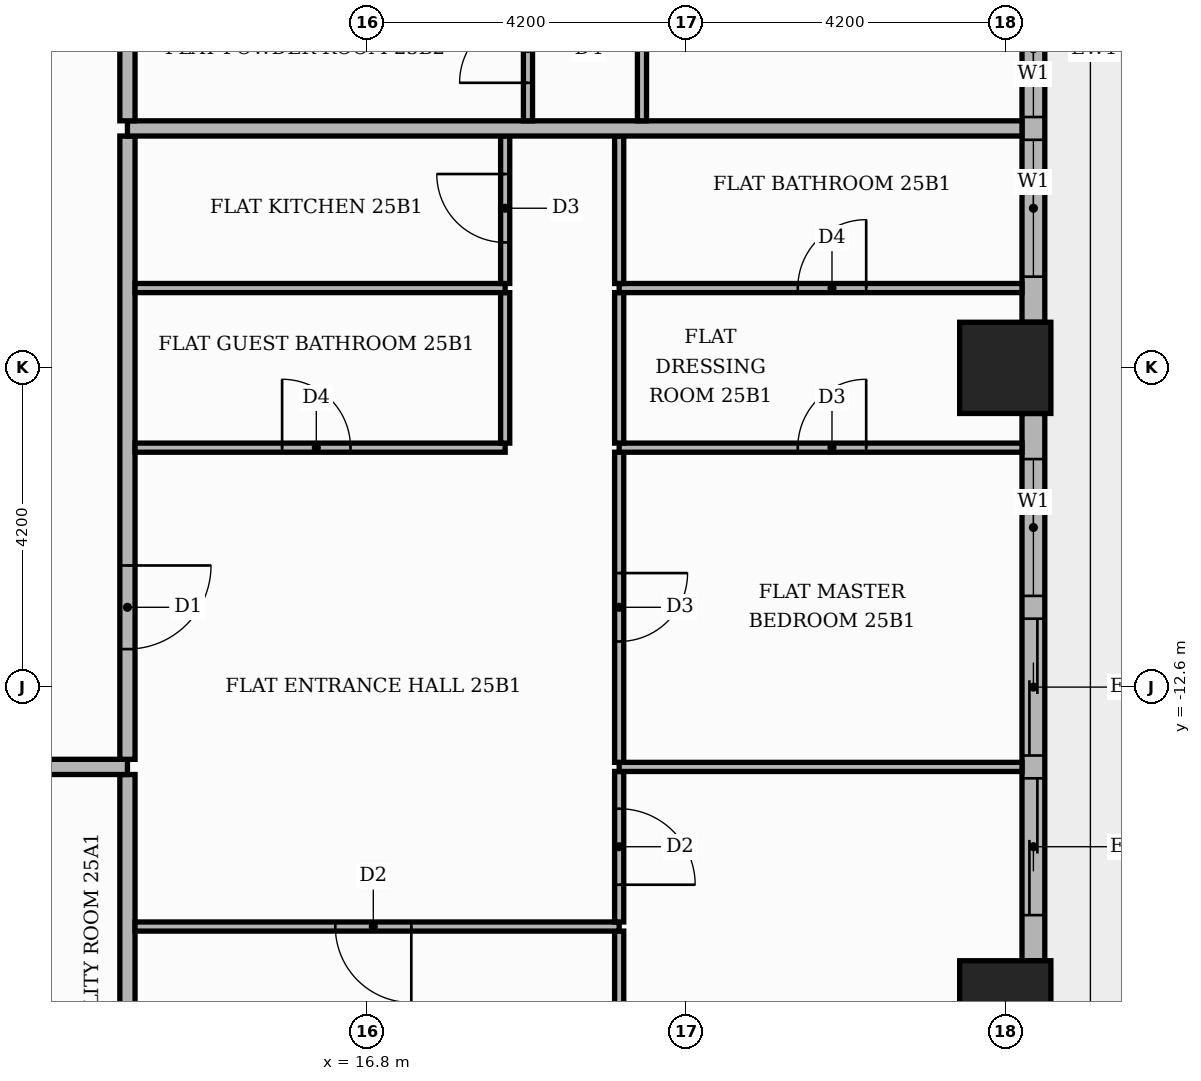
"""IFC4 building model, lengths in metres.
Left out: names, types, materials, properties, quantities, classifications, styles, units other than length and angle.
Written with IfcOpenShell. Run it as: python <this file> out.ifc"""

import sys

from ifc_helpers import new_model, si_unit, direction, frame, frame_2d, origin, origin_2d, place, context, subcontext, project, spatial, rectangle, extrude, element, fill, save


model = new_model("IFC4")
c1 = context("Model", 3, precision=1e-05, world=origin(), true_north=direction((0.0, 1.0)))
c2 = subcontext(c1, "Body", "Model", "MODEL_VIEW")
j1 = project(units=[si_unit("LENGTHUNIT", "METRE"), si_unit("PLANEANGLEUNIT", "RADIAN")], contexts=[c1])
p1 = place(None, origin())
s1 = spatial("IfcSite", under=j1, at=p1, CompositionType="ELEMENT")
p2 = place(p1, origin())
s2 = spatial("IfcBuilding", under=s1, at=p2, CompositionType="ELEMENT")
p3 = place(p2, frame((0.0, 0.0, 106.5)))
s3 = spatial("IfcBuildingStorey", under=s2, at=p3, CompositionType="ELEMENT", Elevation=106.5)
for number, where, z_axis, x_axis in (
    (1, (25.2, -8.4, 0.0), (0.0, 0.0, 1.0), (1.0, 0.0, 0.0)),
    (2, (25.2, -16.8, 0.0), (0.0, 0.0, 1.0), (1.0, 0.0, 0.0)),
):
    element("IfcColumn", number, at=place(p3, frame(where, z_axis=z_axis, x_axis=x_axis)), inside=s3, PredefinedType="COLUMN", context=c2, shape_type="SweptSolid", body=[
        extrude(rectangle(XDim=1.2, YDim=1.2, at=origin_2d()), origin(), (0.0, 0.0, 1.0), 3.9),
    ])
p4 = place(p3, frame((25.57, -16.2, 0.0), z_axis=(0.0, 0.0, 1.0), x_axis=(0.0, 1.0, 0.0)))
e3 = element("IfcWall", 3, at=p4, inside=s3, PredefinedType="STANDARD", context=c2, shape_type="SweptSolid", body=[
    extrude(rectangle(XDim=7.2, YDim=0.3, at=frame_2d((3.6, 0.0))), origin(), (0.0, 0.0, 1.0), 3.48),
])
p5 = place(p4, frame((0.6, 0.0, 0.0)))
e4 = element("IfcOpeningElement", 4, at=p5, cuts=e3, PredefinedType="OPENING", context=c2, shape_type="SweptSolid", body=[
    extrude(rectangle(XDim=1.8, YDim=2.4, at=frame_2d((0.9, 1.2))), frame((0.0, 0.16, 0.0), z_axis=(0.0, -1.0, 0.0), x_axis=(1.0, 0.0, 0.0)), (0.0, 0.0, 1.0), 0.32),
])
p6 = place(p4, frame((2.7, 0.0, 0.0)))
e5 = element("IfcOpeningElement", 5, at=p6, cuts=e3, PredefinedType="OPENING", context=c2, shape_type="SweptSolid", body=[
    extrude(rectangle(XDim=1.8, YDim=2.4, at=frame_2d((0.9, 1.2))), frame((0.0, 0.16, 0.0), z_axis=(0.0, -1.0, 0.0), x_axis=(1.0, 0.0, 0.0)), (0.0, 0.0, 1.0), 0.32),
])
p7 = place(p4, frame((4.8, 0.0, 0.9)))
e6 = element("IfcOpeningElement", 6, at=p7, cuts=e3, PredefinedType="OPENING", context=c2, shape_type="SweptSolid", body=[
    extrude(rectangle(XDim=1.8, YDim=2.1, at=frame_2d((0.9, 1.05))), frame((0.0, 0.16, 0.0), z_axis=(0.0, -1.0, 0.0), x_axis=(1.0, 0.0, 0.0)), (0.0, 0.0, 1.0), 0.32),
])
p8 = place(p3, frame((25.57, -7.8, 0.0), z_axis=(0.0, 0.0, 1.0), x_axis=(0.0, 1.0, 0.0)))
e7 = element("IfcWall", 7, at=p8, inside=s3, PredefinedType="STANDARD", context=c2, shape_type="SweptSolid", body=[
    extrude(rectangle(XDim=7.2, YDim=0.3, at=frame_2d((3.6, 0.0))), origin(), (0.0, 0.0, 1.0), 3.48),
])
p9 = place(p8, frame((0.6, 0.0, 0.9)))
e8 = element("IfcOpeningElement", 8, at=p9, cuts=e7, PredefinedType="OPENING", context=c2, shape_type="SweptSolid", body=[
    extrude(rectangle(XDim=1.8, YDim=2.1, at=frame_2d((0.9, 1.05))), frame((0.0, 0.16, 0.0), z_axis=(0.0, -1.0, 0.0), x_axis=(1.0, 0.0, 0.0)), (0.0, 0.0, 1.0), 0.32),
])
p10 = place(p8, frame((2.7, 0.0, 0.9)))
e9 = element("IfcOpeningElement", 9, at=p10, cuts=e7, PredefinedType="OPENING", context=c2, shape_type="SweptSolid", body=[
    extrude(rectangle(XDim=1.8, YDim=2.1, at=frame_2d((0.9, 1.05))), frame((0.0, 0.16, 0.0), z_axis=(0.0, -1.0, 0.0), x_axis=(1.0, 0.0, 0.0)), (0.0, 0.0, 1.0), 0.32),
])
p11 = place(p8, frame((4.8, 0.0, 0.0)))
e10 = element("IfcOpeningElement", 10, at=p11, cuts=e7, PredefinedType="OPENING", context=c2, shape_type="SweptSolid", body=[
    extrude(rectangle(XDim=1.8, YDim=2.4, at=frame_2d((0.9, 1.2))), frame((0.0, 0.16, 0.0), z_axis=(0.0, -1.0, 0.0), x_axis=(1.0, 0.0, 0.0)), (0.0, 0.0, 1.0), 0.32),
])
p12 = place(p3, frame((13.65, -25.42, 0.0), z_axis=(0.0, 0.0, 1.0), x_axis=(0.0, 1.0, 0.0)))
e11 = element("IfcWall", 11, at=p12, inside=s3, PredefinedType="PARTITIONING", context=c2, shape_type="SweptSolid", body=[
    extrude(rectangle(XDim=11.67, YDim=0.2, at=frame_2d((5.835, 0.0))), origin(), (0.0, 0.0, 1.0), 3.48),
])
p13 = place(p3, frame((20.12, -17.4, 0.0), z_axis=(0.0, 0.0, 1.0), x_axis=(0.0, 1.0, 0.0)))
e12 = element("IfcWall", 12, at=p13, inside=s3, PredefinedType="PARTITIONING", context=c2, shape_type="SweptSolid", body=[
    extrude(rectangle(XDim=1.59, YDim=0.12, at=frame_2d((0.795, 0.0))), origin(), (0.0, 0.0, 1.0), 3.48),
])
p14 = place(p3, frame((13.75, -15.75, 0.0), z_axis=(0.0, 0.0, 1.0), x_axis=(1.0, 0.0, 0.0)))
e13 = element("IfcWall", 13, at=p14, inside=s3, PredefinedType="PARTITIONING", context=c2, shape_type="SweptSolid", body=[
    extrude(rectangle(XDim=6.37, YDim=0.12, at=frame_2d((3.185, 0.0))), origin(), (0.0, 0.0, 1.0), 3.48),
])
p15 = place(p14, frame((2.635, 0.0, 0.0)))
e14 = element("IfcOpeningElement", 14, at=p15, cuts=e13, PredefinedType="OPENING", context=c2, shape_type="SweptSolid", body=[
    extrude(rectangle(XDim=1.0, YDim=2.1, at=frame_2d((0.5, 1.05))), frame((0.0, 0.07, 0.0), z_axis=(0.0, -1.0, 0.0), x_axis=(1.0, 0.0, 0.0)), (0.0, 0.0, 1.0), 0.14),
])
p16 = place(p3, frame((20.12, -15.69, 0.0), z_axis=(0.0, 0.0, 1.0), x_axis=(0.0, 1.0, 0.0)))
e15 = element("IfcWall", 15, at=p16, inside=s3, PredefinedType="PARTITIONING", context=c2, shape_type="SweptSolid", body=[
    extrude(rectangle(XDim=1.98, YDim=0.12, at=frame_2d((0.99, 0.0))), origin(), (0.0, 0.0, 1.0), 3.48),
])
p17 = place(p16, frame((0.49, 0.0, 0.0)))
e16 = element("IfcOpeningElement", 16, at=p17, cuts=e15, PredefinedType="OPENING", context=c2, shape_type="SweptSolid", body=[
    extrude(rectangle(XDim=1.0, YDim=2.1, at=frame_2d((0.5, 1.05))), frame((0.0, 0.07, 0.0), z_axis=(0.0, -1.0, 0.0), x_axis=(1.0, 0.0, 0.0)), (0.0, 0.0, 1.0), 0.14),
])
p18 = place(p3, frame((-25.42, -13.65, 0.0), z_axis=(0.0, 0.0, 1.0), x_axis=(1.0, 0.0, 0.0)))
e17 = element("IfcWall", 17, at=p18, inside=s3, PredefinedType="PARTITIONING", context=c2, shape_type="SweptSolid", body=[
    extrude(rectangle(XDim=39.07, YDim=0.2, at=frame_2d((19.535, 0.0))), origin(), (0.0, 0.0, 1.0), 3.48),
])
p19 = place(p18, frame((13.32, 0.0, 0.0)))
e18 = element("IfcOpeningElement", 18, at=p19, cuts=e17, PredefinedType="OPENING", context=c2, shape_type="SweptSolid", body=[
    extrude(rectangle(XDim=1.1, YDim=2.4, at=frame_2d((0.55, 1.2))), frame((0.0, 0.11, 0.0), z_axis=(0.0, -1.0, 0.0), x_axis=(1.0, 0.0, 0.0)), (0.0, 0.0, 1.0), 0.22),
])
p20 = place(p3, frame((20.12, -13.65, 0.0), z_axis=(0.0, 0.0, 1.0), x_axis=(1.0, 0.0, 0.0)))
e19 = element("IfcWall", 19, at=p20, inside=s3, PredefinedType="PARTITIONING", context=c2, shape_type="SweptSolid", body=[
    extrude(rectangle(XDim=5.3, YDim=0.12, at=frame_2d((2.65, 0.0))), origin(), (0.0, 0.0, 1.0), 3.48),
])
p21 = place(p3, frame((20.12, -13.59, 0.0), z_axis=(0.0, 0.0, 1.0), x_axis=(0.0, 1.0, 0.0)))
e20 = element("IfcWall", 20, at=p21, inside=s3, PredefinedType="PARTITIONING", context=c2, shape_type="SweptSolid", body=[
    extrude(rectangle(XDim=4.08, YDim=0.12, at=frame_2d((2.04, 0.0))), origin(), (0.0, 0.0, 1.0), 3.48),
])
p22 = place(p21, frame((1.59, 0.0, 0.0)))
e21 = element("IfcOpeningElement", 21, at=p22, cuts=e20, PredefinedType="OPENING", context=c2, shape_type="SweptSolid", body=[
    extrude(rectangle(XDim=0.9, YDim=2.1, at=frame_2d((0.45, 1.05))), frame((0.0, 0.07, 0.0), z_axis=(0.0, -1.0, 0.0), x_axis=(1.0, 0.0, 0.0)), (0.0, 0.0, 1.0), 0.14),
])
p23 = place(p3, frame((13.65, -13.55, 0.0), z_axis=(0.0, 0.0, 1.0), x_axis=(0.0, 1.0, 0.0)))
e22 = element("IfcWall", 22, at=p23, inside=s3, PredefinedType="PARTITIONING", context=c2, shape_type="SweptSolid", body=[
    extrude(rectangle(XDim=8.2, YDim=0.2, at=frame_2d((4.1, 0.0))), origin(), (0.0, 0.0, 1.0), 3.48),
])
p24 = place(p23, frame((1.45, 0.0, 0.0)))
e23 = element("IfcOpeningElement", 23, at=p24, cuts=e22, PredefinedType="OPENING", context=c2, shape_type="SweptSolid", body=[
    extrude(rectangle(XDim=1.1, YDim=2.4, at=frame_2d((0.55, 1.2))), frame((0.0, 0.11, 0.0), z_axis=(0.0, -1.0, 0.0), x_axis=(1.0, 0.0, 0.0)), (0.0, 0.0, 1.0), 0.22),
])
p25 = place(p3, frame((13.75, -9.45, 0.0), z_axis=(0.0, 0.0, 1.0), x_axis=(1.0, 0.0, 0.0)))
e24 = element("IfcWall", 24, at=p25, inside=s3, PredefinedType="PARTITIONING", context=c2, shape_type="SweptSolid", body=[
    extrude(rectangle(XDim=4.87, YDim=0.12, at=frame_2d((2.435, 0.0))), origin(), (0.0, 0.0, 1.0), 3.48),
])
p26 = place(p25, frame((1.935, 0.0, 0.0)))
e25 = element("IfcOpeningElement", 25, at=p26, cuts=e24, PredefinedType="OPENING", context=c2, shape_type="SweptSolid", body=[
    extrude(rectangle(XDim=0.9, YDim=2.1, at=frame_2d((0.45, 1.05))), frame((0.0, 0.07, 0.0), z_axis=(0.0, -1.0, 0.0), x_axis=(1.0, 0.0, 0.0)), (0.0, 0.0, 1.0), 0.14),
])
p27 = place(p3, frame((20.12, -9.45, 0.0), z_axis=(0.0, 0.0, 1.0), x_axis=(1.0, 0.0, 0.0)))
e26 = element("IfcWall", 26, at=p27, inside=s3, PredefinedType="PARTITIONING", context=c2, shape_type="SweptSolid", body=[
    extrude(rectangle(XDim=5.3, YDim=0.12, at=frame_2d((2.65, 0.0))), origin(), (0.0, 0.0, 1.0), 3.48),
])
p28 = place(p27, frame((2.35, 0.0, 0.0)))
e27 = element("IfcOpeningElement", 27, at=p28, cuts=e26, PredefinedType="OPENING", context=c2, shape_type="SweptSolid", body=[
    extrude(rectangle(XDim=0.9, YDim=2.1, at=frame_2d((0.45, 1.05))), frame((0.0, 0.07, 0.0), z_axis=(0.0, -1.0, 0.0), x_axis=(1.0, 0.0, 0.0)), (0.0, 0.0, 1.0), 0.14),
])
for number, where, z_axis, x_axis in (
    (28, (18.62, -9.39, 0.0), (0.0, 0.0, 1.0), (0.0, 1.0, 0.0)),
    (29, (20.12, -9.39, 0.0), (0.0, 0.0, 1.0), (0.0, 1.0, 0.0)),
):
    element("IfcWall", number, at=place(p3, frame(where, z_axis=z_axis, x_axis=x_axis)), inside=s3, PredefinedType="PARTITIONING", context=c2, shape_type="SweptSolid", body=[
        extrude(rectangle(XDim=1.98, YDim=0.12, at=frame_2d((0.99, 0.0))), origin(), (0.0, 0.0, 1.0), 3.48),
    ])
p29 = place(p3, frame((13.75, -7.35, 0.0), z_axis=(0.0, 0.0, 1.0), x_axis=(1.0, 0.0, 0.0)))
e30 = element("IfcWall", 30, at=p29, inside=s3, PredefinedType="PARTITIONING", context=c2, shape_type="SweptSolid", body=[
    extrude(rectangle(XDim=4.87, YDim=0.12, at=frame_2d((2.435, 0.0))), origin(), (0.0, 0.0, 1.0), 3.48),
])
p30 = place(p3, frame((20.12, -7.35, 0.0), z_axis=(0.0, 0.0, 1.0), x_axis=(1.0, 0.0, 0.0)))
e31 = element("IfcWall", 31, at=p30, inside=s3, PredefinedType="PARTITIONING", context=c2, shape_type="SweptSolid", body=[
    extrude(rectangle(XDim=5.3, YDim=0.12, at=frame_2d((2.65, 0.0))), origin(), (0.0, 0.0, 1.0), 3.48),
])
p31 = place(p30, frame((2.35, 0.0, 0.0)))
e32 = element("IfcOpeningElement", 32, at=p31, cuts=e31, PredefinedType="OPENING", context=c2, shape_type="SweptSolid", body=[
    extrude(rectangle(XDim=0.9, YDim=2.1, at=frame_2d((0.45, 1.05))), frame((0.0, 0.07, 0.0), z_axis=(0.0, -1.0, 0.0), x_axis=(1.0, 0.0, 0.0)), (0.0, 0.0, 1.0), 0.14),
])
p32 = place(p3, frame((18.62, -7.29, 0.0), z_axis=(0.0, 0.0, 1.0), x_axis=(0.0, 1.0, 0.0)))
e33 = element("IfcWall", 33, at=p32, inside=s3, PredefinedType="PARTITIONING", context=c2, shape_type="SweptSolid", body=[
    extrude(rectangle(XDim=1.94, YDim=0.12, at=frame_2d((0.97, 0.0))), origin(), (0.0, 0.0, 1.0), 3.48),
])
p33 = place(p32, frame((0.54, 0.0, 0.0)))
e34 = element("IfcOpeningElement", 34, at=p33, cuts=e33, PredefinedType="OPENING", context=c2, shape_type="SweptSolid", body=[
    extrude(rectangle(XDim=0.9, YDim=2.1, at=frame_2d((0.45, 1.05))), frame((0.0, 0.07, 0.0), z_axis=(0.0, -1.0, 0.0), x_axis=(1.0, 0.0, 0.0)), (0.0, 0.0, 1.0), 0.14),
])
p34 = place(p3, frame((20.12, -7.29, 0.0), z_axis=(0.0, 0.0, 1.0), x_axis=(0.0, 1.0, 0.0)))
e35 = element("IfcWall", 35, at=p34, inside=s3, PredefinedType="PARTITIONING", context=c2, shape_type="SweptSolid", body=[
    extrude(rectangle(XDim=1.94, YDim=0.12, at=frame_2d((0.97, 0.0))), origin(), (0.0, 0.0, 1.0), 3.48),
])
p35 = place(p3, frame((13.65, -5.25, 0.0), z_axis=(0.0, 0.0, 1.0), x_axis=(1.0, 0.0, 0.0)))
e36 = element("IfcWall", 36, at=p35, inside=s3, PredefinedType="PARTITIONING", context=c2, shape_type="SweptSolid", body=[
    extrude(rectangle(XDim=11.77, YDim=0.2, at=frame_2d((5.885, 0.0))), origin(), (0.0, 0.0, 1.0), 3.48),
])
p36 = place(p3, frame((13.65, -5.15, 0.0), z_axis=(0.0, 0.0, 1.0), x_axis=(0.0, 1.0, 0.0)))
e37 = element("IfcWall", 37, at=p36, inside=s3, PredefinedType="PARTITIONING", context=c2, shape_type="SweptSolid", body=[
    extrude(rectangle(XDim=18.7, YDim=0.2, at=frame_2d((9.35, 0.0))), origin(), (0.0, 0.0, 1.0), 3.48),
])
p37 = place(p36, frame((5.65, 0.0, 0.0)))
e38 = element("IfcOpeningElement", 38, at=p37, cuts=e37, PredefinedType="OPENING", context=c2, shape_type="SweptSolid", body=[
    extrude(rectangle(XDim=1.1, YDim=2.4, at=frame_2d((0.55, 1.2))), frame((0.0, 0.11, 0.0), z_axis=(0.0, -1.0, 0.0), x_axis=(1.0, 0.0, 0.0)), (0.0, 0.0, 1.0), 0.22),
])
p38 = place(p3, frame((18.92, -5.15, 0.0), z_axis=(0.0, 0.0, 1.0), x_axis=(0.0, 1.0, 0.0)))
e39 = element("IfcWall", 39, at=p38, inside=s3, PredefinedType="PARTITIONING", context=c2, shape_type="SweptSolid", body=[
    extrude(rectangle(XDim=1.94, YDim=0.12, at=frame_2d((0.97, 0.0))), origin(), (0.0, 0.0, 1.0), 3.48),
])
p39 = place(p38, frame((0.5, 0.0, 0.0)))
e40 = element("IfcOpeningElement", 40, at=p39, cuts=e39, PredefinedType="OPENING", context=c2, shape_type="SweptSolid", body=[
    extrude(rectangle(XDim=0.9, YDim=2.1, at=frame_2d((0.45, 1.05))), frame((0.0, 0.07, 0.0), z_axis=(0.0, -1.0, 0.0), x_axis=(1.0, 0.0, 0.0)), (0.0, 0.0, 1.0), 0.14),
])
p40 = place(p3, frame((20.42, -5.15, 0.0), z_axis=(0.0, 0.0, 1.0), x_axis=(0.0, 1.0, 0.0)))
e41 = element("IfcWall", 41, at=p40, inside=s3, PredefinedType="PARTITIONING", context=c2, shape_type="SweptSolid", body=[
    extrude(rectangle(XDim=6.14, YDim=0.12, at=frame_2d((3.07, 0.0))), origin(), (0.0, 0.0, 1.0), 3.48),
])
p41 = place(p40, frame((2.55, 0.0, 0.0)))
e42 = element("IfcOpeningElement", 42, at=p41, cuts=e41, PredefinedType="OPENING", context=c2, shape_type="SweptSolid", body=[
    extrude(rectangle(XDim=1.0, YDim=2.1, at=frame_2d((0.5, 1.05))), frame((0.0, 0.07, 0.0), z_axis=(0.0, -1.0, 0.0), x_axis=(1.0, 0.0, 0.0)), (0.0, 0.0, 1.0), 0.14),
])
p42 = place(p5, origin())
e43 = element("IfcDoor", 43, at=p42, inside=s3, OperationType="SLIDING_TO_LEFT", PredefinedType="DOOR", context=c2, shape_type="SweptSolid", body=[
    extrude(rectangle(XDim=1.8, YDim=2.4, at=frame_2d((0.9, 1.2))), frame((0.0, 0.025, 0.0), z_axis=(0.0, -1.0, 0.0), x_axis=(1.0, 0.0, 0.0)), (0.0, 0.0, 1.0), 0.05),
])
fill(e4, e43)
p43 = place(p6, origin())
e44 = element("IfcDoor", 44, at=p43, inside=s3, OperationType="SLIDING_TO_RIGHT", PredefinedType="DOOR", context=c2, shape_type="SweptSolid", body=[
    extrude(rectangle(XDim=1.8, YDim=2.4, at=frame_2d((0.9, 1.2))), frame((0.0, 0.025, 0.0), z_axis=(0.0, -1.0, 0.0), x_axis=(1.0, 0.0, 0.0)), (0.0, 0.0, 1.0), 0.05),
])
fill(e5, e44)
p44 = place(p7, origin())
e45 = element("IfcWindow", 45, at=p44, inside=s3, PartitioningType="SINGLE_PANEL", PredefinedType="WINDOW", context=c2, shape_type="SweptSolid", body=[
    extrude(rectangle(XDim=1.8, YDim=2.1, at=frame_2d((0.9, 1.05))), frame((0.0, 0.03, 0.0), z_axis=(0.0, -1.0, 0.0), x_axis=(1.0, 0.0, 0.0)), (0.0, 0.0, 1.0), 0.06),
])
fill(e6, e45)
p45 = place(p9, origin())
e46 = element("IfcWindow", 46, at=p45, inside=s3, PartitioningType="SINGLE_PANEL", PredefinedType="WINDOW", context=c2, shape_type="SweptSolid", body=[
    extrude(rectangle(XDim=1.8, YDim=2.1, at=frame_2d((0.9, 1.05))), frame((0.0, 0.03, 0.0), z_axis=(0.0, -1.0, 0.0), x_axis=(1.0, 0.0, 0.0)), (0.0, 0.0, 1.0), 0.06),
])
fill(e8, e46)
p46 = place(p10, origin())
e47 = element("IfcWindow", 47, at=p46, inside=s3, PartitioningType="SINGLE_PANEL", PredefinedType="WINDOW", context=c2, shape_type="SweptSolid", body=[
    extrude(rectangle(XDim=1.8, YDim=2.1, at=frame_2d((0.9, 1.05))), frame((0.0, 0.03, 0.0), z_axis=(0.0, -1.0, 0.0), x_axis=(1.0, 0.0, 0.0)), (0.0, 0.0, 1.0), 0.06),
])
fill(e9, e47)
p47 = place(p24, frame((1.1, 0.0, 0.0), z_axis=(0.0, 0.0, 1.0), x_axis=(-1.0, 0.0, 0.0)))
e48 = element("IfcDoor", 48, at=p47, inside=s3, OperationType="SINGLE_SWING_RIGHT", PredefinedType="DOOR", context=c2, shape_type="SweptSolid", body=[
    extrude(rectangle(XDim=1.1, YDim=2.4, at=frame_2d((0.55, 1.2))), frame((0.0, 0.025, 0.0), z_axis=(0.0, -1.0, 0.0), x_axis=(1.0, 0.0, 0.0)), (0.0, 0.0, 1.0), 0.05),
])
fill(e23, e48)
p48 = place(p15, frame((1.0, 0.0, 0.0), z_axis=(0.0, 0.0, 1.0), x_axis=(-1.0, 0.0, 0.0)))
e49 = element("IfcDoor", 49, at=p48, inside=s3, OperationType="SINGLE_SWING_RIGHT", PredefinedType="DOOR", context=c2, shape_type="SweptSolid", body=[
    extrude(rectangle(XDim=1.0, YDim=2.1, at=frame_2d((0.5, 1.05))), frame((0.0, 0.025, 0.0), z_axis=(0.0, -1.0, 0.0), x_axis=(1.0, 0.0, 0.0)), (0.0, 0.0, 1.0), 0.05),
])
fill(e14, e49)
p49 = place(p26, origin())
e50 = element("IfcDoor", 50, at=p49, inside=s3, OperationType="SINGLE_SWING_LEFT", PredefinedType="DOOR", context=c2, shape_type="SweptSolid", body=[
    extrude(rectangle(XDim=0.9, YDim=2.1, at=frame_2d((0.45, 1.05))), frame((0.0, 0.025, 0.0), z_axis=(0.0, -1.0, 0.0), x_axis=(1.0, 0.0, 0.0)), (0.0, 0.0, 1.0), 0.05),
])
fill(e25, e50)
p50 = place(p33, origin())
e51 = element("IfcDoor", 51, at=p50, inside=s3, OperationType="SINGLE_SWING_RIGHT", PredefinedType="DOOR", context=c2, shape_type="SweptSolid", body=[
    extrude(rectangle(XDim=0.9, YDim=2.1, at=frame_2d((0.45, 1.05))), frame((0.0, 0.025, 0.0), z_axis=(0.0, -1.0, 0.0), x_axis=(1.0, 0.0, 0.0)), (0.0, 0.0, 1.0), 0.05),
])
fill(e34, e51)
p51 = place(p17, frame((1.0, 0.0, 0.0), z_axis=(0.0, 0.0, 1.0), x_axis=(-1.0, 0.0, 0.0)))
e52 = element("IfcDoor", 52, at=p51, inside=s3, OperationType="SINGLE_SWING_LEFT", PredefinedType="DOOR", context=c2, shape_type="SweptSolid", body=[
    extrude(rectangle(XDim=1.0, YDim=2.1, at=frame_2d((0.5, 1.05))), frame((0.0, 0.025, 0.0), z_axis=(0.0, -1.0, 0.0), x_axis=(1.0, 0.0, 0.0)), (0.0, 0.0, 1.0), 0.05),
])
fill(e16, e52)
p52 = place(p22, frame((0.9, 0.0, 0.0), z_axis=(0.0, 0.0, 1.0), x_axis=(-1.0, 0.0, 0.0)))
e53 = element("IfcDoor", 53, at=p52, inside=s3, OperationType="SINGLE_SWING_RIGHT", PredefinedType="DOOR", context=c2, shape_type="SweptSolid", body=[
    extrude(rectangle(XDim=0.9, YDim=2.1, at=frame_2d((0.45, 1.05))), frame((0.0, 0.025, 0.0), z_axis=(0.0, -1.0, 0.0), x_axis=(1.0, 0.0, 0.0)), (0.0, 0.0, 1.0), 0.05),
])
fill(e21, e53)
p53 = place(p28, origin())
e54 = element("IfcDoor", 54, at=p53, inside=s3, OperationType="SINGLE_SWING_RIGHT", PredefinedType="DOOR", context=c2, shape_type="SweptSolid", body=[
    extrude(rectangle(XDim=0.9, YDim=2.1, at=frame_2d((0.45, 1.05))), frame((0.0, 0.025, 0.0), z_axis=(0.0, -1.0, 0.0), x_axis=(1.0, 0.0, 0.0)), (0.0, 0.0, 1.0), 0.05),
])
fill(e27, e54)
p54 = place(p31, origin())
e55 = element("IfcDoor", 55, at=p54, inside=s3, OperationType="SINGLE_SWING_RIGHT", PredefinedType="DOOR", context=c2, shape_type="SweptSolid", body=[
    extrude(rectangle(XDim=0.9, YDim=2.1, at=frame_2d((0.45, 1.05))), frame((0.0, 0.025, 0.0), z_axis=(0.0, -1.0, 0.0), x_axis=(1.0, 0.0, 0.0)), (0.0, 0.0, 1.0), 0.05),
])
fill(e32, e55)
p55 = place(p39, origin())
e56 = element("IfcDoor", 56, at=p55, inside=s3, OperationType="SINGLE_SWING_LEFT", PredefinedType="DOOR", context=c2, shape_type="SweptSolid", body=[
    extrude(rectangle(XDim=0.9, YDim=2.1, at=frame_2d((0.45, 1.05))), frame((0.0, 0.025, 0.0), z_axis=(0.0, -1.0, 0.0), x_axis=(1.0, 0.0, 0.0)), (0.0, 0.0, 1.0), 0.05),
])
fill(e40, e56)
save(model, sys.argv[1])
